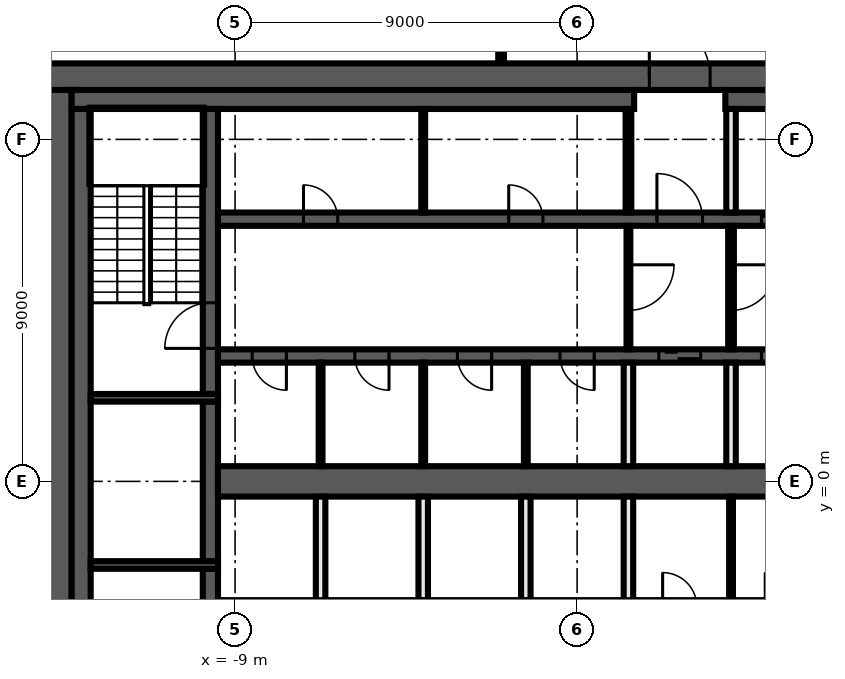
"""IFC4 building model, lengths in metres.
Left out: names, types, materials, properties, quantities, classifications, styles, units other than length and angle.
Written with IfcOpenShell. Run it as: python <this file> out.ifc"""

import sys

from ifc_helpers import new_model, si_unit, direction, frame, frame_2d, origin, place, context, subcontext, project, spatial, rectangle, extrude, element, fill, save


model = new_model("IFC4")
c1 = context("Model", 3, precision=1e-05, world=origin(), true_north=direction((0.0, 1.0)))
c2 = subcontext(c1, "Body", "Model", "MODEL_VIEW")
j1 = project(units=[si_unit("LENGTHUNIT", "METRE"), si_unit("PLANEANGLEUNIT", "RADIAN")], contexts=[c1])
p1 = place(None, origin())
s1 = spatial("IfcSite", under=j1, at=p1, CompositionType="ELEMENT")
p2 = place(p1, origin())
s2 = spatial("IfcBuilding", under=s1, at=p2, CompositionType="ELEMENT")
p3 = place(p2, frame((0.0, 0.0, 228.6)))
s3 = spatial("IfcBuildingStorey", under=s2, at=p3, CompositionType="ELEMENT", Elevation=228.6)
p4 = place(p3, frame((-2.0, 11.0, 0.0), z_axis=(0.0, 0.0, 1.0), x_axis=(0.0, 1.0, 0.0)))
e1 = element("IfcWall", 1, at=p4, inside=s3, PredefinedType="PARTITIONING", context=c2, shape_type="SweptSolid", body=[
    extrude(rectangle(XDim=2.325, YDim=0.15, at=frame_2d((1.163, 0.0))), origin(), (0.0, 0.0, 1.0), 3.75),
])
p5 = place(p3, frame((-14.0, 10.65, 0.0), z_axis=(0.0, 0.0, 1.0), x_axis=(1.0, 0.0, 0.0)))
e2 = element("IfcWall", 2, at=p5, inside=s3, PredefinedType="SHEAR", context=c2, shape_type="SweptSolid", body=[
    extrude(rectangle(XDim=28.0, YDim=0.7, at=frame_2d((14.0, 0.0))), origin(), (0.0, 0.0, 1.0), 3.75),
])
p6 = place(p5, frame((15.9, 0.0, 0.0)))
e3 = element("IfcOpeningElement", 3, at=p6, cuts=e2, PredefinedType="OPENING", context=c2, shape_type="SweptSolid", body=[
    extrude(rectangle(XDim=1.6, YDim=2.1, at=frame_2d((0.8, 1.05))), frame((0.0, 0.36, 0.0), z_axis=(0.0, -1.0, 0.0), x_axis=(1.0, 0.0, 0.0)), (0.0, 0.0, 1.0), 0.72),
])
p7 = place(p3, frame((-13.65, -10.3, 0.0), z_axis=(0.0, 0.0, 1.0), x_axis=(0.0, 1.0, 0.0)))
e4 = element("IfcWall", 4, at=p7, inside=s3, PredefinedType="SHEAR", context=c2, shape_type="SweptSolid", body=[
    extrude(rectangle(XDim=20.6, YDim=0.7, at=frame_2d((10.3, 0.0))), origin(), (0.0, 0.0, 1.0), 3.75),
])
p8 = place(p3, frame((-13.3, 10.05, 0.0), z_axis=(0.0, 0.0, 1.0), x_axis=(1.0, 0.0, 0.0)))
e5 = element("IfcWall", 5, at=p8, inside=s3, PredefinedType="SHEAR", context=c2, shape_type="SweptSolid", body=[
    extrude(rectangle(XDim=14.8, YDim=0.5, at=frame_2d((7.4, 0.0))), origin(), (0.0, 0.0, 1.0), 3.75),
])
p9 = place(p3, frame((3.9, 10.05, 0.0), z_axis=(0.0, 0.0, 1.0), x_axis=(1.0, 0.0, 0.0)))
e6 = element("IfcWall", 6, at=p9, inside=s3, PredefinedType="SHEAR", context=c2, shape_type="SweptSolid", body=[
    extrude(rectangle(XDim=9.4, YDim=0.5, at=frame_2d((4.7, 0.0))), origin(), (0.0, 0.0, 1.0), 3.75),
])
p10 = place(p3, frame((-13.05, -9.8, 0.0), z_axis=(0.0, 0.0, 1.0), x_axis=(0.0, 1.0, 0.0)))
e7 = element("IfcWall", 7, at=p10, inside=s3, PredefinedType="SHEAR", context=c2, shape_type="SweptSolid", body=[
    extrude(rectangle(XDim=19.6, YDim=0.5, at=frame_2d((9.8, 0.0))), origin(), (0.0, 0.0, 1.0), 3.75),
])
p11 = place(p3, frame((-9.65, -9.8, 0.0), z_axis=(0.0, 0.0, 1.0), x_axis=(0.0, 1.0, 0.0)))
e8 = element("IfcWall", 8, at=p11, inside=s3, PredefinedType="SHEAR", context=c2, shape_type="SweptSolid", body=[
    extrude(rectangle(XDim=7.5, YDim=0.4, at=frame_2d((3.75, 0.0))), origin(), (0.0, 0.0, 1.0), 3.75),
])
p12 = place(p11, frame((5.1, 0.0, 0.0)))
e9 = element("IfcOpeningElement", 9, at=p12, cuts=e8, PredefinedType="OPENING", context=c2, shape_type="SweptSolid", body=[
    extrude(rectangle(XDim=1.2, YDim=2.1, at=frame_2d((0.6, 1.05))), frame((0.0, 0.21, 0.0), z_axis=(0.0, -1.0, 0.0), x_axis=(1.0, 0.0, 0.0)), (0.0, 0.0, 1.0), 0.42),
])
p13 = place(p3, frame((-9.65, -2.1, 0.0), z_axis=(0.0, 0.0, 1.0), x_axis=(0.0, 1.0, 0.0)))
e10 = element("IfcWall", 10, at=p13, inside=s3, PredefinedType="SHEAR", context=c2, shape_type="SweptSolid", body=[
    extrude(rectangle(XDim=4.2, YDim=0.4, at=frame_2d((2.1, 0.0))), origin(), (0.0, 0.0, 1.0), 3.75),
])
p14 = place(p3, frame((-9.65, 2.3, 0.0), z_axis=(0.0, 0.0, 1.0), x_axis=(0.0, 1.0, 0.0)))
e11 = element("IfcWall", 11, at=p14, inside=s3, PredefinedType="SHEAR", context=c2, shape_type="SweptSolid", body=[
    extrude(rectangle(XDim=7.5, YDim=0.4, at=frame_2d((3.75, 0.0))), origin(), (0.0, 0.0, 1.0), 3.75),
])
p15 = place(p14, frame((1.2, 0.0, 0.0)))
e12 = element("IfcOpeningElement", 12, at=p15, cuts=e11, PredefinedType="OPENING", context=c2, shape_type="SweptSolid", body=[
    extrude(rectangle(XDim=1.2, YDim=2.1, at=frame_2d((0.6, 1.05))), frame((0.0, 0.21, 0.0), z_axis=(0.0, -1.0, 0.0), x_axis=(1.0, 0.0, 0.0)), (0.0, 0.0, 1.0), 0.42),
])
for number, where, z_axis, x_axis in (
    (13, (-9.45, 2.2, 0.0), (0.0, 0.0, 1.0), (-1.0, 0.0, 0.0)),
    (14, (-9.45, -2.2, 0.0), (0.0, 0.0, 1.0), (-1.0, 0.0, 0.0)),
):
    element("IfcWall", number, at=place(p3, frame(where, z_axis=z_axis, x_axis=x_axis)), inside=s3, PredefinedType="SHEAR", context=c2, shape_type="SweptSolid", body=[
        extrude(rectangle(XDim=3.35, YDim=0.2, at=frame_2d((1.675, 0.0))), origin(), (0.0, 0.0, 1.0), 3.75),
    ])
p16 = place(p3, frame((-9.45, 6.9, 0.0), z_axis=(0.0, 0.0, 1.0), x_axis=(1.0, 0.0, 0.0)))
e15 = element("IfcWall", 15, at=p16, inside=s3, PredefinedType="SHEAR", context=c2, shape_type="SweptSolid", body=[
    extrude(rectangle(XDim=18.9, YDim=0.35, at=frame_2d((9.45, 0.0))), origin(), (0.0, 0.0, 1.0), 3.75),
])
p17 = place(p16, frame((11.55, 0.0, 0.0)))
e16 = element("IfcOpeningElement", 16, at=p17, cuts=e15, PredefinedType="OPENING", context=c2, shape_type="SweptSolid", body=[
    extrude(rectangle(XDim=1.2, YDim=2.1, at=frame_2d((0.6, 1.05))), frame((0.0, 0.185, 0.0), z_axis=(0.0, -1.0, 0.0), x_axis=(1.0, 0.0, 0.0)), (0.0, 0.0, 1.0), 0.37),
])
p18 = place(p16, frame((14.3, 0.0, 0.0)))
e17 = element("IfcOpeningElement", 17, at=p18, cuts=e15, PredefinedType="OPENING", context=c2, shape_type="SweptSolid", body=[
    extrude(rectangle(XDim=1.1, YDim=2.1, at=frame_2d((0.55, 1.05))), frame((0.0, 0.185, 0.0), z_axis=(0.0, -1.0, 0.0), x_axis=(1.0, 0.0, 0.0)), (0.0, 0.0, 1.0), 0.37),
])
p19 = place(p16, frame((17.0, 0.0, 0.0)))
e18 = element("IfcOpeningElement", 18, at=p19, cuts=e15, PredefinedType="OPENING", context=c2, shape_type="SweptSolid", body=[
    extrude(rectangle(XDim=1.1, YDim=2.1, at=frame_2d((0.55, 1.05))), frame((0.0, 0.185, 0.0), z_axis=(0.0, -1.0, 0.0), x_axis=(1.0, 0.0, 0.0)), (0.0, 0.0, 1.0), 0.37),
])
p20 = place(p16, frame((2.25, 0.0, 0.0)))
e19 = element("IfcOpeningElement", 19, at=p20, cuts=e15, PredefinedType="OPENING", context=c2, shape_type="SweptSolid", body=[
    extrude(rectangle(XDim=0.9, YDim=2.1, at=frame_2d((0.45, 1.05))), frame((0.0, 0.185, 0.0), z_axis=(0.0, -1.0, 0.0), x_axis=(1.0, 0.0, 0.0)), (0.0, 0.0, 1.0), 0.37),
])
p21 = place(p16, frame((7.65, 0.0, 0.0)))
e20 = element("IfcOpeningElement", 20, at=p21, cuts=e15, PredefinedType="OPENING", context=c2, shape_type="SweptSolid", body=[
    extrude(rectangle(XDim=0.9, YDim=2.1, at=frame_2d((0.45, 1.05))), frame((0.0, 0.185, 0.0), z_axis=(0.0, -1.0, 0.0), x_axis=(1.0, 0.0, 0.0)), (0.0, 0.0, 1.0), 0.37),
])
p22 = place(p3, frame((9.45, 3.3, 0.0), z_axis=(0.0, 0.0, 1.0), x_axis=(-1.0, 0.0, 0.0)))
e21 = element("IfcWall", 21, at=p22, inside=s3, PredefinedType="SHEAR", context=c2, shape_type="SweptSolid", body=[
    extrude(rectangle(XDim=18.9, YDim=0.35, at=frame_2d((9.45, 0.0))), origin(), (0.0, 0.0, 1.0), 3.75),
])
p23 = place(p22, frame((6.2, 0.0, 0.0)))
e22 = element("IfcOpeningElement", 22, at=p23, cuts=e21, PredefinedType="OPENING", context=c2, shape_type="SweptSolid", body=[
    extrude(rectangle(XDim=1.1, YDim=2.1, at=frame_2d((0.55, 1.05))), frame((0.0, 0.185, 0.0), z_axis=(0.0, -1.0, 0.0), x_axis=(1.0, 0.0, 0.0)), (0.0, 0.0, 1.0), 0.37),
])
p24 = place(p22, frame((3.5, 0.0, 0.0)))
e23 = element("IfcOpeningElement", 23, at=p24, cuts=e21, PredefinedType="OPENING", context=c2, shape_type="SweptSolid", body=[
    extrude(rectangle(XDim=1.1, YDim=2.1, at=frame_2d((0.55, 1.05))), frame((0.0, 0.185, 0.0), z_axis=(0.0, -1.0, 0.0), x_axis=(1.0, 0.0, 0.0)), (0.0, 0.0, 1.0), 0.37),
])
p25 = place(p22, frame((0.9, 0.0, 0.0)))
e24 = element("IfcOpeningElement", 24, at=p25, cuts=e21, PredefinedType="OPENING", context=c2, shape_type="SweptSolid", body=[
    extrude(rectangle(XDim=0.9, YDim=2.1, at=frame_2d((0.45, 1.05))), frame((0.0, 0.185, 0.0), z_axis=(0.0, -1.0, 0.0), x_axis=(1.0, 0.0, 0.0)), (0.0, 0.0, 1.0), 0.37),
])
p26 = place(p22, frame((17.1, 0.0, 0.0)))
e25 = element("IfcOpeningElement", 25, at=p26, cuts=e21, PredefinedType="OPENING", context=c2, shape_type="SweptSolid", body=[
    extrude(rectangle(XDim=0.9, YDim=2.1, at=frame_2d((0.45, 1.05))), frame((0.0, 0.185, 0.0), z_axis=(0.0, -1.0, 0.0), x_axis=(1.0, 0.0, 0.0)), (0.0, 0.0, 1.0), 0.37),
])
p27 = place(p22, frame((14.4, 0.0, 0.0)))
e26 = element("IfcOpeningElement", 26, at=p27, cuts=e21, PredefinedType="OPENING", context=c2, shape_type="SweptSolid", body=[
    extrude(rectangle(XDim=0.9, YDim=2.1, at=frame_2d((0.45, 1.05))), frame((0.0, 0.185, 0.0), z_axis=(0.0, -1.0, 0.0), x_axis=(1.0, 0.0, 0.0)), (0.0, 0.0, 1.0), 0.37),
])
p28 = place(p22, frame((11.7, 0.0, 0.0)))
e27 = element("IfcOpeningElement", 27, at=p28, cuts=e21, PredefinedType="OPENING", context=c2, shape_type="SweptSolid", body=[
    extrude(rectangle(XDim=0.9, YDim=2.1, at=frame_2d((0.45, 1.05))), frame((0.0, 0.185, 0.0), z_axis=(0.0, -1.0, 0.0), x_axis=(1.0, 0.0, 0.0)), (0.0, 0.0, 1.0), 0.37),
])
p29 = place(p22, frame((9.0, 0.0, 0.0)))
e28 = element("IfcOpeningElement", 28, at=p29, cuts=e21, PredefinedType="OPENING", context=c2, shape_type="SweptSolid", body=[
    extrude(rectangle(XDim=0.9, YDim=2.1, at=frame_2d((0.45, 1.05))), frame((0.0, 0.185, 0.0), z_axis=(0.0, -1.0, 0.0), x_axis=(1.0, 0.0, 0.0)), (0.0, 0.0, 1.0), 0.37),
])
p30 = place(p3, frame((-9.45, 0.0, 0.0), z_axis=(0.0, 0.0, 1.0), x_axis=(1.0, 0.0, 0.0)))
e29 = element("IfcWall", 29, at=p30, inside=s3, PredefinedType="SHEAR", context=c2, shape_type="SweptSolid", body=[
    extrude(rectangle(XDim=18.9, YDim=0.8, at=frame_2d((9.45, 0.0))), origin(), (0.0, 0.0, 1.0), 3.75),
])
p31 = place(p3, frame((4.05, 6.725, 0.0), z_axis=(0.0, 0.0, 1.0), x_axis=(0.0, -1.0, 0.0)))
e30 = element("IfcWall", 30, at=p31, inside=s3, PredefinedType="PARTITIONING", context=c2, shape_type="SweptSolid", body=[
    extrude(rectangle(XDim=3.25, YDim=0.15, at=frame_2d((1.625, 0.0))), origin(), (0.0, 0.0, 1.0), 3.75),
])
p32 = place(p31, frame((1.025, 0.0, 0.0)))
e31 = element("IfcOpeningElement", 31, at=p32, cuts=e30, PredefinedType="OPENING", context=c2, shape_type="SweptSolid", body=[
    extrude(rectangle(XDim=1.2, YDim=2.1, at=frame_2d((0.6, 1.05))), frame((0.0, 0.085, 0.0), z_axis=(0.0, -1.0, 0.0), x_axis=(1.0, 0.0, 0.0)), (0.0, 0.0, 1.0), 0.17),
])
p33 = place(p3, frame((4.05, -3.125, 0.0), z_axis=(0.0, 0.0, 1.0), x_axis=(0.0, 1.0, 0.0)))
e32 = element("IfcWall", 32, at=p33, inside=s3, PredefinedType="PARTITIONING", context=c2, shape_type="SweptSolid", body=[
    extrude(rectangle(XDim=2.725, YDim=0.1, at=frame_2d((1.363, 0.0))), origin(), (0.0, 0.0, 1.0), 3.75),
])
for number, where, z_axis, x_axis in (
    (33, (4.05, 0.4, 0.0), (0.0, 0.0, 1.0), (0.0, 1.0, 0.0)),
    (34, (4.05, 7.075, 0.0), (0.0, 0.0, 1.0), (0.0, 1.0, 0.0)),
):
    element("IfcWall", number, at=place(p3, frame(where, z_axis=z_axis, x_axis=x_axis)), inside=s3, PredefinedType="SOLIDWALL", context=c2, shape_type="SweptSolid", body=[
        extrude(rectangle(XDim=2.725, YDim=0.25, at=frame_2d((1.363, 0.0))), origin(), (0.0, 0.0, 1.0), 3.75),
    ])
p34 = place(p3, frame((1.35, 7.075, 0.0), z_axis=(0.0, 0.0, 1.0), x_axis=(0.0, 1.0, 0.0)))
e35 = element("IfcWall", 35, at=p34, inside=s3, PredefinedType="PARTITIONING", context=c2, shape_type="SweptSolid", body=[
    extrude(rectangle(XDim=2.725, YDim=0.15, at=frame_2d((1.363, 0.0))), origin(), (0.0, 0.0, 1.0), 3.75),
])
p35 = place(p3, frame((1.35, 6.725, 0.0), z_axis=(0.0, 0.0, 1.0), x_axis=(0.0, -1.0, 0.0)))
e36 = element("IfcWall", 36, at=p35, inside=s3, PredefinedType="PARTITIONING", context=c2, shape_type="SweptSolid", body=[
    extrude(rectangle(XDim=3.25, YDim=0.1, at=frame_2d((1.625, 0.0))), origin(), (0.0, 0.0, 1.0), 3.75),
])
p36 = place(p35, frame((1.025, 0.0, 0.0)))
e37 = element("IfcOpeningElement", 37, at=p36, cuts=e36, PredefinedType="OPENING", context=c2, shape_type="SweptSolid", body=[
    extrude(rectangle(XDim=1.2, YDim=2.1, at=frame_2d((0.6, 1.05))), frame((0.0, 0.06, 0.0), z_axis=(0.0, -1.0, 0.0), x_axis=(1.0, 0.0, 0.0)), (0.0, 0.0, 1.0), 0.12),
])
for number, where, z_axis, x_axis in (
    (38, (1.35, -3.125, 0.0), (0.0, 0.0, 1.0), (0.0, 1.0, 0.0)),
    (39, (1.35, 0.4, 0.0), (0.0, 0.0, 1.0), (0.0, 1.0, 0.0)),
):
    element("IfcWall", number, at=place(p3, frame(where, z_axis=z_axis, x_axis=x_axis)), inside=s3, PredefinedType="SOLIDWALL", context=c2, shape_type="SweptSolid", body=[
        extrude(rectangle(XDim=2.725, YDim=0.25, at=frame_2d((1.363, 0.0))), origin(), (0.0, 0.0, 1.0), 3.75),
    ])
p37 = place(p3, frame((-1.35, 0.4, 0.0), z_axis=(0.0, 0.0, 1.0), x_axis=(0.0, 1.0, 0.0)))
e40 = element("IfcWall", 40, at=p37, inside=s3, PredefinedType="PARTITIONING", context=c2, shape_type="SweptSolid", body=[
    extrude(rectangle(XDim=2.725, YDim=0.1, at=frame_2d((1.363, 0.0))), origin(), (0.0, 0.0, 1.0), 3.75),
])
p38 = place(p3, frame((-1.35, -3.125, 0.0), z_axis=(0.0, 0.0, 1.0), x_axis=(0.0, 1.0, 0.0)))
e41 = element("IfcWall", 41, at=p38, inside=s3, PredefinedType="SOLIDWALL", context=c2, shape_type="SweptSolid", body=[
    extrude(rectangle(XDim=2.725, YDim=0.25, at=frame_2d((1.363, 0.0))), origin(), (0.0, 0.0, 1.0), 3.75),
])
for number, where, z_axis, x_axis in (
    (42, (-4.05, 0.4, 0.0), (0.0, 0.0, 1.0), (0.0, 1.0, 0.0)),
    (43, (-4.05, 7.075, 0.0), (0.0, 0.0, 1.0), (0.0, 1.0, 0.0)),
):
    element("IfcWall", number, at=place(p3, frame(where, z_axis=z_axis, x_axis=x_axis)), inside=s3, PredefinedType="PARTITIONING", context=c2, shape_type="SweptSolid", body=[
        extrude(rectangle(XDim=2.725, YDim=0.1, at=frame_2d((1.363, 0.0))), origin(), (0.0, 0.0, 1.0), 3.75),
    ])
p39 = place(p3, frame((-4.05, -3.125, 0.0), z_axis=(0.0, 0.0, 1.0), x_axis=(0.0, 1.0, 0.0)))
e44 = element("IfcWall", 44, at=p39, inside=s3, PredefinedType="SOLIDWALL", context=c2, shape_type="SweptSolid", body=[
    extrude(rectangle(XDim=2.725, YDim=0.25, at=frame_2d((1.363, 0.0))), origin(), (0.0, 0.0, 1.0), 3.75),
])
p40 = place(p3, frame((-6.75, 0.4, 0.0), z_axis=(0.0, 0.0, 1.0), x_axis=(0.0, 1.0, 0.0)))
e45 = element("IfcWall", 45, at=p40, inside=s3, PredefinedType="PARTITIONING", context=c2, shape_type="SweptSolid", body=[
    extrude(rectangle(XDim=2.725, YDim=0.1, at=frame_2d((1.363, 0.0))), origin(), (0.0, 0.0, 1.0), 3.75),
])
p41 = place(p3, frame((-6.75, -3.125, 0.0), z_axis=(0.0, 0.0, 1.0), x_axis=(0.0, 1.0, 0.0)))
e46 = element("IfcWall", 46, at=p41, inside=s3, PredefinedType="SOLIDWALL", context=c2, shape_type="SweptSolid", body=[
    extrude(rectangle(XDim=2.725, YDim=0.25, at=frame_2d((1.363, 0.0))), origin(), (0.0, 0.0, 1.0), 3.75),
])
p42 = place(p6, origin())
e47 = element("IfcDoor", 47, at=p42, inside=s3, OperationType="DOUBLE_DOOR_SINGLE_SWING", PredefinedType="DOOR", context=c2, shape_type="SweptSolid", body=[
    extrude(rectangle(XDim=1.6, YDim=2.1, at=frame_2d((0.8, 1.05))), frame((0.0, 0.025, 0.0), z_axis=(0.0, -1.0, 0.0), x_axis=(1.0, 0.0, 0.0)), (0.0, 0.0, 1.0), 0.05),
])
fill(e3, e47)
p43 = place(p17, origin())
e48 = element("IfcDoor", 48, at=p43, inside=s3, OperationType="SINGLE_SWING_LEFT", PredefinedType="DOOR", context=c2, shape_type="SweptSolid", body=[
    extrude(rectangle(XDim=1.2, YDim=2.1, at=frame_2d((0.6, 1.05))), frame((0.0, 0.025, 0.0), z_axis=(0.0, -1.0, 0.0), x_axis=(1.0, 0.0, 0.0)), (0.0, 0.0, 1.0), 0.05),
])
fill(e16, e48)
p44 = place(p18, origin())
e49 = element("IfcDoor", 49, at=p44, inside=s3, OperationType="DOUBLE_DOOR_SLIDING", PredefinedType="DOOR", context=c2, shape_type="SweptSolid", body=[
    extrude(rectangle(XDim=1.1, YDim=2.1, at=frame_2d((0.55, 1.05))), frame((0.0, 0.025, 0.0), z_axis=(0.0, -1.0, 0.0), x_axis=(1.0, 0.0, 0.0)), (0.0, 0.0, 1.0), 0.05),
])
fill(e17, e49)
p45 = place(p23, origin())
e50 = element("IfcDoor", 50, at=p45, inside=s3, OperationType="DOUBLE_DOOR_SLIDING", PredefinedType="DOOR", context=c2, shape_type="SweptSolid", body=[
    extrude(rectangle(XDim=1.1, YDim=2.1, at=frame_2d((0.55, 1.05))), frame((0.0, 0.025, 0.0), z_axis=(0.0, -1.0, 0.0), x_axis=(1.0, 0.0, 0.0)), (0.0, 0.0, 1.0), 0.05),
])
fill(e22, e50)
p46 = place(p24, origin())
e51 = element("IfcDoor", 51, at=p46, inside=s3, OperationType="DOUBLE_DOOR_SLIDING", PredefinedType="DOOR", context=c2, shape_type="SweptSolid", body=[
    extrude(rectangle(XDim=1.1, YDim=2.1, at=frame_2d((0.55, 1.05))), frame((0.0, 0.025, 0.0), z_axis=(0.0, -1.0, 0.0), x_axis=(1.0, 0.0, 0.0)), (0.0, 0.0, 1.0), 0.05),
])
fill(e23, e51)
p47 = place(p20, origin())
e52 = element("IfcDoor", 52, at=p47, inside=s3, OperationType="SINGLE_SWING_RIGHT", PredefinedType="DOOR", context=c2, shape_type="SweptSolid", body=[
    extrude(rectangle(XDim=0.9, YDim=2.1, at=frame_2d((0.45, 1.05))), frame((0.0, 0.025, 0.0), z_axis=(0.0, -1.0, 0.0), x_axis=(1.0, 0.0, 0.0)), (0.0, 0.0, 1.0), 0.05),
])
fill(e19, e52)
p48 = place(p21, origin())
e53 = element("IfcDoor", 53, at=p48, inside=s3, OperationType="SINGLE_SWING_LEFT", PredefinedType="DOOR", context=c2, shape_type="SweptSolid", body=[
    extrude(rectangle(XDim=0.9, YDim=2.1, at=frame_2d((0.45, 1.05))), frame((0.0, 0.025, 0.0), z_axis=(0.0, -1.0, 0.0), x_axis=(1.0, 0.0, 0.0)), (0.0, 0.0, 1.0), 0.05),
])
fill(e20, e53)
p49 = place(p26, origin())
e54 = element("IfcDoor", 54, at=p49, inside=s3, OperationType="SINGLE_SWING_RIGHT", PredefinedType="DOOR", context=c2, shape_type="SweptSolid", body=[
    extrude(rectangle(XDim=0.9, YDim=2.1, at=frame_2d((0.45, 1.05))), frame((0.0, 0.025, 0.0), z_axis=(0.0, -1.0, 0.0), x_axis=(1.0, 0.0, 0.0)), (0.0, 0.0, 1.0), 0.05),
])
fill(e25, e54)
p50 = place(p27, origin())
e55 = element("IfcDoor", 55, at=p50, inside=s3, OperationType="SINGLE_SWING_LEFT", PredefinedType="DOOR", context=c2, shape_type="SweptSolid", body=[
    extrude(rectangle(XDim=0.9, YDim=2.1, at=frame_2d((0.45, 1.05))), frame((0.0, 0.025, 0.0), z_axis=(0.0, -1.0, 0.0), x_axis=(1.0, 0.0, 0.0)), (0.0, 0.0, 1.0), 0.05),
])
fill(e26, e55)
p51 = place(p28, origin())
e56 = element("IfcDoor", 56, at=p51, inside=s3, OperationType="SINGLE_SWING_RIGHT", PredefinedType="DOOR", context=c2, shape_type="SweptSolid", body=[
    extrude(rectangle(XDim=0.9, YDim=2.1, at=frame_2d((0.45, 1.05))), frame((0.0, 0.025, 0.0), z_axis=(0.0, -1.0, 0.0), x_axis=(1.0, 0.0, 0.0)), (0.0, 0.0, 1.0), 0.05),
])
fill(e27, e56)
p52 = place(p29, origin())
e57 = element("IfcDoor", 57, at=p52, inside=s3, OperationType="SINGLE_SWING_LEFT", PredefinedType="DOOR", context=c2, shape_type="SweptSolid", body=[
    extrude(rectangle(XDim=0.9, YDim=2.1, at=frame_2d((0.45, 1.05))), frame((0.0, 0.025, 0.0), z_axis=(0.0, -1.0, 0.0), x_axis=(1.0, 0.0, 0.0)), (0.0, 0.0, 1.0), 0.05),
])
fill(e28, e57)
p53 = place(p15, origin())
e58 = element("IfcDoor", 58, at=p53, inside=s3, OperationType="SINGLE_SWING_RIGHT", PredefinedType="DOOR", context=c2, shape_type="SweptSolid", body=[
    extrude(rectangle(XDim=1.2, YDim=2.1, at=frame_2d((0.6, 1.05))), frame((0.0, 0.025, 0.0), z_axis=(0.0, -1.0, 0.0), x_axis=(1.0, 0.0, 0.0)), (0.0, 0.0, 1.0), 0.05),
])
fill(e12, e58)
p54 = place(p36, origin())
e59 = element("IfcDoor", 59, at=p54, inside=s3, OperationType="SINGLE_SWING_LEFT", PredefinedType="DOOR", context=c2, shape_type="SweptSolid", body=[
    extrude(rectangle(XDim=1.2, YDim=2.1, at=frame_2d((0.6, 1.05))), frame((0.0, 0.025, 0.0), z_axis=(0.0, -1.0, 0.0), x_axis=(1.0, 0.0, 0.0)), (0.0, 0.0, 1.0), 0.05),
])
fill(e37, e59)
p55 = place(p32, origin())
e60 = element("IfcDoor", 60, at=p55, inside=s3, OperationType="SINGLE_SWING_RIGHT", PredefinedType="DOOR", context=c2, shape_type="SweptSolid", body=[
    extrude(rectangle(XDim=1.2, YDim=2.1, at=frame_2d((0.6, 1.05))), frame((0.0, 0.025, 0.0), z_axis=(0.0, -1.0, 0.0), x_axis=(1.0, 0.0, 0.0)), (0.0, 0.0, 1.0), 0.05),
])
fill(e31, e60)
save(model, sys.argv[1])
